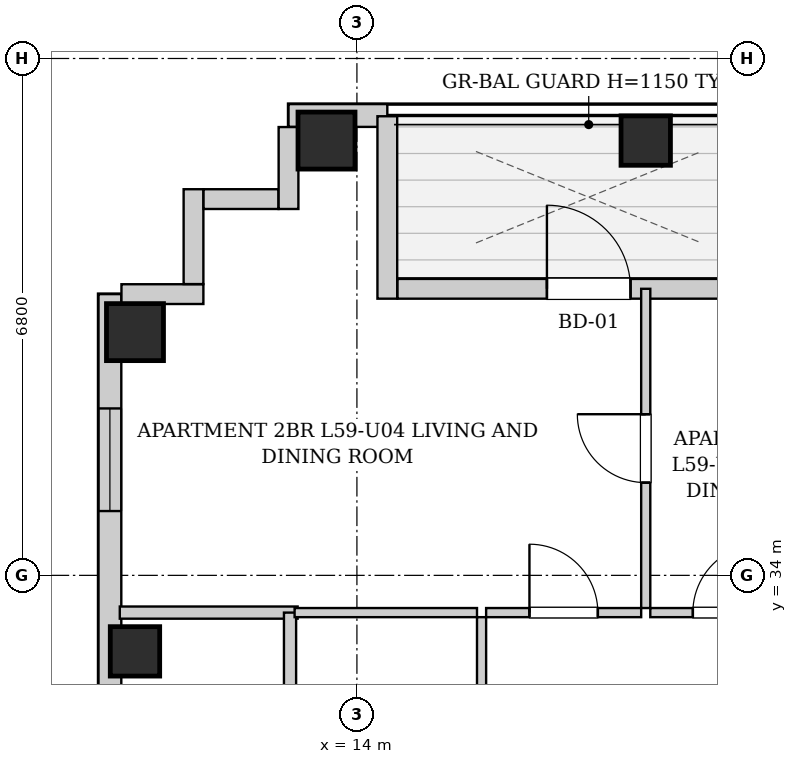
"""IFC4 building model, lengths in metres.
Left out: names, types, materials, properties, quantities, classifications, styles, units other than length and angle.
Written with IfcOpenShell. Run it as: python <this file> out.ifc"""

import sys

from ifc_helpers import new_model, si_unit, direction, frame, frame_2d, origin, origin_2d, place, context, subcontext, project, spatial, rectangle, extrude, element, fill, save


model = new_model("IFC4")
c1 = context("Model", 3, precision=1e-05, world=origin(), true_north=direction((0.0, 1.0)))
c2 = subcontext(c1, "Body", "Model", "MODEL_VIEW")
j1 = project(units=[si_unit("LENGTHUNIT", "METRE"), si_unit("PLANEANGLEUNIT", "RADIAN")], contexts=[c1])
p1 = place(None, origin())
s1 = spatial("IfcSite", under=j1, at=p1, CompositionType="ELEMENT")
p2 = place(p1, origin())
s2 = spatial("IfcBuilding", under=s1, at=p2, CompositionType="ELEMENT")
p3 = place(p2, frame((0.0, 0.0, 204.1)))
s3 = spatial("IfcBuildingStorey", under=s2, at=p3, CompositionType="ELEMENT", Elevation=204.1)
p4 = place(p3, frame((13.6, 39.72, 0.0), z_axis=(0.0, 0.0, 1.0), x_axis=(1.0, 0.0, 0.0)))
e1 = element("IfcColumn", 1, at=p4, inside=s3, PredefinedType="COLUMN", context=c2, shape_type="SweptSolid", body=[
    extrude(rectangle(XDim=0.75, YDim=0.75, at=origin_2d()), origin(), (0.0, 0.0, 1.0), 3.3),
])
for number, where, z_axis, x_axis in (
    (2, (17.8, 39.72, 0.0), (0.0, 0.0, 1.0), (1.0, 0.0, 0.0)),
    (3, (11.08, 33.0, 0.0), (0.0, 0.0, 1.0), (1.0, 0.0, 0.0)),
):
    element("IfcColumn", number, at=place(p3, frame(where, z_axis=z_axis, x_axis=x_axis)), inside=s3, PredefinedType="COLUMN", context=c2, shape_type="SweptSolid", body=[
        extrude(rectangle(XDim=0.65, YDim=0.65, at=origin_2d()), origin(), (0.0, 0.0, 1.0), 3.3),
    ])
p5 = place(p3, frame((11.08, 37.2, 0.0), z_axis=(0.0, 0.0, 1.0), x_axis=(1.0, 0.0, 0.0)))
e4 = element("IfcColumn", 4, at=p5, inside=s3, PredefinedType="COLUMN", context=c2, shape_type="SweptSolid", body=[
    extrude(rectangle(XDim=0.75, YDim=0.75, at=origin_2d()), origin(), (0.0, 0.0, 1.0), 3.3),
])
p6 = place(p3, frame((13.1, 40.05, 0.0), z_axis=(0.0, 0.0, 1.0), x_axis=(1.0, 0.0, 0.0)))
e5 = element("IfcWall", 5, at=p6, inside=s3, PredefinedType="SOLIDWALL", context=c2, shape_type="SweptSolid", body=[
    extrude(rectangle(XDim=1.3, YDim=0.3, at=frame_2d((0.65, 0.0))), origin(), (0.0, 0.0, 1.0), 3.04),
])
p7 = place(p3, frame((14.4, 40.04, 0.0), z_axis=(0.0, 0.0, 1.0), x_axis=(0.0, -1.0, 0.0)))
e6 = element("IfcWall", 6, at=p7, inside=s3, PredefinedType="SOLIDWALL", context=c2, shape_type="SweptSolid", body=[
    extrude(rectangle(XDim=2.4, YDim=0.26, at=frame_2d((1.2, 0.0))), origin(), (0.0, 0.0, 1.0), 3.04),
])
p8 = place(p3, frame((14.534, 37.77, 0.0), z_axis=(0.0, 0.0, 1.0), x_axis=(1.0, 0.0, 0.0)))
e7 = element("IfcWall", 7, at=p8, inside=s3, PredefinedType="SOLIDWALL", context=c2, shape_type="SweptSolid", body=[
    extrude(rectangle(XDim=5.032, YDim=0.26, at=frame_2d((2.516, 0.0))), origin(), (0.0, 0.0, 1.0), 3.04),
])
p9 = place(p8, frame((1.966, 0.0, 0.0)))
e8 = element("IfcOpeningElement", 8, at=p9, cuts=e7, PredefinedType="OPENING", context=c2, shape_type="SweptSolid", body=[
    extrude(rectangle(XDim=1.1, YDim=2.0, at=frame_2d((0.55, 1.0))), frame((0.0, 0.14, 0.0), z_axis=(0.0, -1.0, 0.0), x_axis=(1.0, 0.0, 0.0)), (0.0, 0.0, 1.0), 0.28),
])
p10 = place(p3, frame((10.75, 6.3, 0.0), z_axis=(0.0, 0.0, 1.0), x_axis=(0.0, 1.0, 0.0)))
e9 = element("IfcWall", 9, at=p10, inside=s3, PredefinedType="SOLIDWALL", context=c2, shape_type="SweptSolid", body=[
    extrude(rectangle(XDim=31.4, YDim=0.3, at=frame_2d((15.7, 0.0))), origin(), (0.0, 0.0, 1.0), 3.04),
])
p11 = place(p10, frame((1.504, 0.0, 0.55)))
e10 = element("IfcOpeningElement", 10, at=p11, cuts=e9, PredefinedType="OPENING", context=c2, shape_type="SweptSolid", body=[
    extrude(rectangle(XDim=1.35, YDim=1.2, at=frame_2d((0.675, 0.6))), frame((0.0, 0.16, 0.0), z_axis=(0.0, -1.0, 0.0), x_axis=(1.0, 0.0, 0.0)), (0.0, 0.0, 1.0), 0.32),
])
p12 = place(p10, frame((28.546, 0.0, 0.55)))
e11 = element("IfcOpeningElement", 11, at=p12, cuts=e9, PredefinedType="OPENING", context=c2, shape_type="SweptSolid", body=[
    extrude(rectangle(XDim=1.35, YDim=1.2, at=frame_2d((0.675, 0.6))), frame((0.0, 0.16, 0.0), z_axis=(0.0, -1.0, 0.0), x_axis=(1.0, 0.0, 0.0)), (0.0, 0.0, 1.0), 0.32),
])
p13 = place(p10, frame((11.85, 0.0, 0.55)))
e12 = element("IfcOpeningElement", 12, at=p13, cuts=e9, PredefinedType="OPENING", context=c2, shape_type="SweptSolid", body=[
    extrude(rectangle(XDim=1.35, YDim=1.2, at=frame_2d((0.675, 0.6))), frame((0.0, 0.16, 0.0), z_axis=(0.0, -1.0, 0.0), x_axis=(1.0, 0.0, 0.0)), (0.0, 0.0, 1.0), 0.32),
])
p14 = place(p10, frame((9.185, 0.0, 0.55)))
e13 = element("IfcOpeningElement", 13, at=p14, cuts=e9, PredefinedType="OPENING", context=c2, shape_type="SweptSolid", body=[
    extrude(rectangle(XDim=1.35, YDim=1.2, at=frame_2d((0.675, 0.6))), frame((0.0, 0.16, 0.0), z_axis=(0.0, -1.0, 0.0), x_axis=(1.0, 0.0, 0.0)), (0.0, 0.0, 1.0), 0.32),
])
p15 = place(p10, frame((19.006, 0.0, 0.55)))
e14 = element("IfcOpeningElement", 14, at=p15, cuts=e9, PredefinedType="OPENING", context=c2, shape_type="SweptSolid", body=[
    extrude(rectangle(XDim=1.35, YDim=1.2, at=frame_2d((0.675, 0.6))), frame((0.0, 0.16, 0.0), z_axis=(0.0, -1.0, 0.0), x_axis=(1.0, 0.0, 0.0)), (0.0, 0.0, 1.0), 0.32),
])
p16 = place(p10, frame((20.616, 0.0, 0.55)))
e15 = element("IfcOpeningElement", 15, at=p16, cuts=e9, PredefinedType="OPENING", context=c2, shape_type="SweptSolid", body=[
    extrude(rectangle(XDim=1.35, YDim=1.2, at=frame_2d((0.675, 0.6))), frame((0.0, 0.16, 0.0), z_axis=(0.0, -1.0, 0.0), x_axis=(1.0, 0.0, 0.0)), (0.0, 0.0, 1.0), 0.32),
])
p17 = place(p3, frame((10.902, 37.7, 0.0), z_axis=(0.0, 0.0, 1.0), x_axis=(1.0, 0.0, 0.0)))
e16 = element("IfcWall", 16, at=p17, inside=s3, PredefinedType="SOLIDWALL", context=c2, shape_type="SweptSolid", body=[
    extrude(rectangle(XDim=1.078, YDim=0.26, at=frame_2d((0.539, 0.0))), origin(), (0.0, 0.0, 1.0), 3.04),
])
p18 = place(p3, frame((11.85, 37.832, 0.0), z_axis=(0.0, 0.0, 1.0), x_axis=(0.0, 1.0, 0.0)))
e17 = element("IfcWall", 17, at=p18, inside=s3, PredefinedType="SOLIDWALL", context=c2, shape_type="SweptSolid", body=[
    extrude(rectangle(XDim=1.248, YDim=0.26, at=frame_2d((0.624, 0.0))), origin(), (0.0, 0.0, 1.0), 3.04),
])
p19 = place(p3, frame((11.982, 38.95, 0.0), z_axis=(0.0, 0.0, 1.0), x_axis=(1.0, 0.0, 0.0)))
e18 = element("IfcWall", 18, at=p19, inside=s3, PredefinedType="SOLIDWALL", context=c2, shape_type="SweptSolid", body=[
    extrude(rectangle(XDim=0.986, YDim=0.26, at=frame_2d((0.493, 0.0))), origin(), (0.0, 0.0, 1.0), 3.04),
])
p20 = place(p3, frame((13.1, 38.82, 0.0), z_axis=(0.0, 0.0, 1.0), x_axis=(0.0, 1.0, 0.0)))
e19 = element("IfcWall", 19, at=p20, inside=s3, PredefinedType="SOLIDWALL", context=c2, shape_type="SweptSolid", body=[
    extrude(rectangle(XDim=1.078, YDim=0.26, at=frame_2d((0.539, 0.0))), origin(), (0.0, 0.0, 1.0), 3.04),
])
p21 = place(p3, frame((10.88, 33.51, 0.0), z_axis=(0.0, 0.0, 1.0), x_axis=(1.0, 0.0, 0.0)))
e20 = element("IfcWall", 20, at=p21, inside=s3, PredefinedType="PARTITIONING", context=c2, shape_type="SweptSolid", body=[
    extrude(rectangle(XDim=2.34, YDim=0.16, at=frame_2d((1.17, 0.0))), origin(), (0.0, 0.0, 1.0), 3.04),
])
p22 = place(p3, frame((13.12, 30.6, 0.0), z_axis=(0.0, 0.0, 1.0), x_axis=(0.0, 1.0, 0.0)))
e21 = element("IfcWall", 21, at=p22, inside=s3, PredefinedType="PARTITIONING", context=c2, shape_type="SweptSolid", body=[
    extrude(rectangle(XDim=2.91, YDim=0.16, at=frame_2d((1.455, 0.0))), origin(), (0.0, 0.0, 1.0), 3.04),
])
p23 = place(p3, frame((15.64, 30.6, 0.0), z_axis=(0.0, 0.0, 1.0), x_axis=(0.0, 1.0, 0.0)))
e22 = element("IfcWall", 22, at=p23, inside=s3, PredefinedType="PARTITIONING", context=c2, shape_type="SweptSolid", body=[
    extrude(rectangle(XDim=2.85, YDim=0.12, at=frame_2d((1.425, 0.0))), origin(), (0.0, 0.0, 1.0), 3.04),
])
p24 = place(p23, frame((0.995, 0.0, 0.0)))
e23 = element("IfcOpeningElement", 23, at=p24, cuts=e22, PredefinedType="OPENING", context=c2, shape_type="SweptSolid", body=[
    extrude(rectangle(XDim=0.86, YDim=2.05, at=frame_2d((0.43, 1.025))), frame((0.0, 0.07, 0.0), z_axis=(0.0, -1.0, 0.0), x_axis=(1.0, 0.0, 0.0)), (0.0, 0.0, 1.0), 0.14),
])
p25 = place(p3, frame((13.18, 33.51, 0.0), z_axis=(0.0, 0.0, 1.0), x_axis=(1.0, 0.0, 0.0)))
e24 = element("IfcWall", 24, at=p25, inside=s3, PredefinedType="PARTITIONING", context=c2, shape_type="SweptSolid", body=[
    extrude(rectangle(XDim=2.4, YDim=0.12, at=frame_2d((1.2, 0.0))), origin(), (0.0, 0.0, 1.0), 3.04),
])
p26 = place(p3, frame((15.7, 33.51, 0.0), z_axis=(0.0, 0.0, 1.0), x_axis=(1.0, 0.0, 0.0)))
e25 = element("IfcWall", 25, at=p26, inside=s3, PredefinedType="PARTITIONING", context=c2, shape_type="SweptSolid", body=[
    extrude(rectangle(XDim=2.04, YDim=0.12, at=frame_2d((1.02, 0.0))), origin(), (0.0, 0.0, 1.0), 3.04),
])
p27 = place(p26, frame((0.57, 0.0, 0.0)))
e26 = element("IfcOpeningElement", 26, at=p27, cuts=e25, PredefinedType="OPENING", context=c2, shape_type="SweptSolid", body=[
    extrude(rectangle(XDim=0.9, YDim=2.05, at=frame_2d((0.45, 1.025))), frame((0.0, 0.07, 0.0), z_axis=(0.0, -1.0, 0.0), x_axis=(1.0, 0.0, 0.0)), (0.0, 0.0, 1.0), 0.14),
])
p28 = place(p3, frame((17.86, 33.51, 0.0), z_axis=(0.0, 0.0, 1.0), x_axis=(1.0, 0.0, 0.0)))
e27 = element("IfcWall", 27, at=p28, inside=s3, PredefinedType="PARTITIONING", context=c2, shape_type="SweptSolid", body=[
    extrude(rectangle(XDim=2.02, YDim=0.12, at=frame_2d((1.01, 0.0))), origin(), (0.0, 0.0, 1.0), 3.04),
])
p29 = place(p28, frame((0.56, 0.0, 0.0)))
e28 = element("IfcOpeningElement", 28, at=p29, cuts=e27, PredefinedType="OPENING", context=c2, shape_type="SweptSolid", body=[
    extrude(rectangle(XDim=0.9, YDim=2.05, at=frame_2d((0.45, 1.025))), frame((0.0, 0.07, 0.0), z_axis=(0.0, -1.0, 0.0), x_axis=(1.0, 0.0, 0.0)), (0.0, 0.0, 1.0), 0.14),
])
p30 = place(p3, frame((17.8, 33.57, 0.0), z_axis=(0.0, 0.0, 1.0), x_axis=(0.0, 1.0, 0.0)))
e29 = element("IfcWall", 29, at=p30, inside=s3, PredefinedType="PARTITIONING", context=c2, shape_type="SweptSolid", body=[
    extrude(rectangle(XDim=4.2, YDim=0.12, at=frame_2d((2.1, 0.0))), origin(), (0.0, 0.0, 1.0), 2.556),
])
p31 = place(p30, frame((1.65, 0.0, 0.0)))
e30 = element("IfcOpeningElement", 30, at=p31, cuts=e29, PredefinedType="OPENING", context=c2, shape_type="SweptSolid", body=[
    extrude(rectangle(XDim=0.9, YDim=2.05, at=frame_2d((0.45, 1.025))), frame((0.0, 0.07, 0.0), z_axis=(0.0, -1.0, 0.0), x_axis=(1.0, 0.0, 0.0)), (0.0, 0.0, 1.0), 0.14),
])
p32 = place(p27, origin())
e31 = element("IfcDoor", 31, at=p32, inside=s3, OperationType="SINGLE_SWING_LEFT", PredefinedType="DOOR", context=c2, shape_type="SweptSolid", body=[
    extrude(rectangle(XDim=0.9, YDim=2.05, at=frame_2d((0.45, 1.025))), frame((0.0, 0.025, 0.0), z_axis=(0.0, -1.0, 0.0), x_axis=(1.0, 0.0, 0.0)), (0.0, 0.0, 1.0), 0.05),
])
fill(e26, e31)
p33 = place(p29, origin())
e32 = element("IfcDoor", 32, at=p33, inside=s3, OperationType="SINGLE_SWING_RIGHT", PredefinedType="DOOR", context=c2, shape_type="SweptSolid", body=[
    extrude(rectangle(XDim=0.9, YDim=2.05, at=frame_2d((0.45, 1.025))), frame((0.0, 0.025, 0.0), z_axis=(0.0, -1.0, 0.0), x_axis=(1.0, 0.0, 0.0)), (0.0, 0.0, 1.0), 0.05),
])
fill(e28, e32)
p34 = place(p31, origin())
e33 = element("IfcDoor", 33, at=p34, inside=s3, OperationType="SINGLE_SWING_RIGHT", PredefinedType="DOOR", context=c2, shape_type="SweptSolid", body=[
    extrude(rectangle(XDim=0.9, YDim=2.05, at=frame_2d((0.45, 1.025))), frame((0.0, 0.025, 0.0), z_axis=(0.0, -1.0, 0.0), x_axis=(1.0, 0.0, 0.0)), (0.0, 0.0, 1.0), 0.05),
])
fill(e30, e33)
p35 = place(p9, origin())
e34 = element("IfcDoor", 34, at=p35, inside=s3, OperationType="SINGLE_SWING_LEFT", PredefinedType="DOOR", context=c2, shape_type="SweptSolid", body=[
    extrude(rectangle(XDim=1.1, YDim=2.0, at=frame_2d((0.55, 1.0))), frame((0.0, 0.025, 0.0), z_axis=(0.0, -1.0, 0.0), x_axis=(1.0, 0.0, 0.0)), (0.0, 0.0, 1.0), 0.05),
])
fill(e8, e34)
p36 = place(p12, origin())
e35 = element("IfcWindow", 35, at=p36, inside=s3, PartitioningType="SINGLE_PANEL", PredefinedType="WINDOW", context=c2, shape_type="SweptSolid", body=[
    extrude(rectangle(XDim=1.35, YDim=1.2, at=frame_2d((0.675, 0.6))), frame((0.0, 0.03, 0.0), z_axis=(0.0, -1.0, 0.0), x_axis=(1.0, 0.0, 0.0)), (0.0, 0.0, 1.0), 0.06),
])
fill(e11, e35)
save(model, sys.argv[1])
